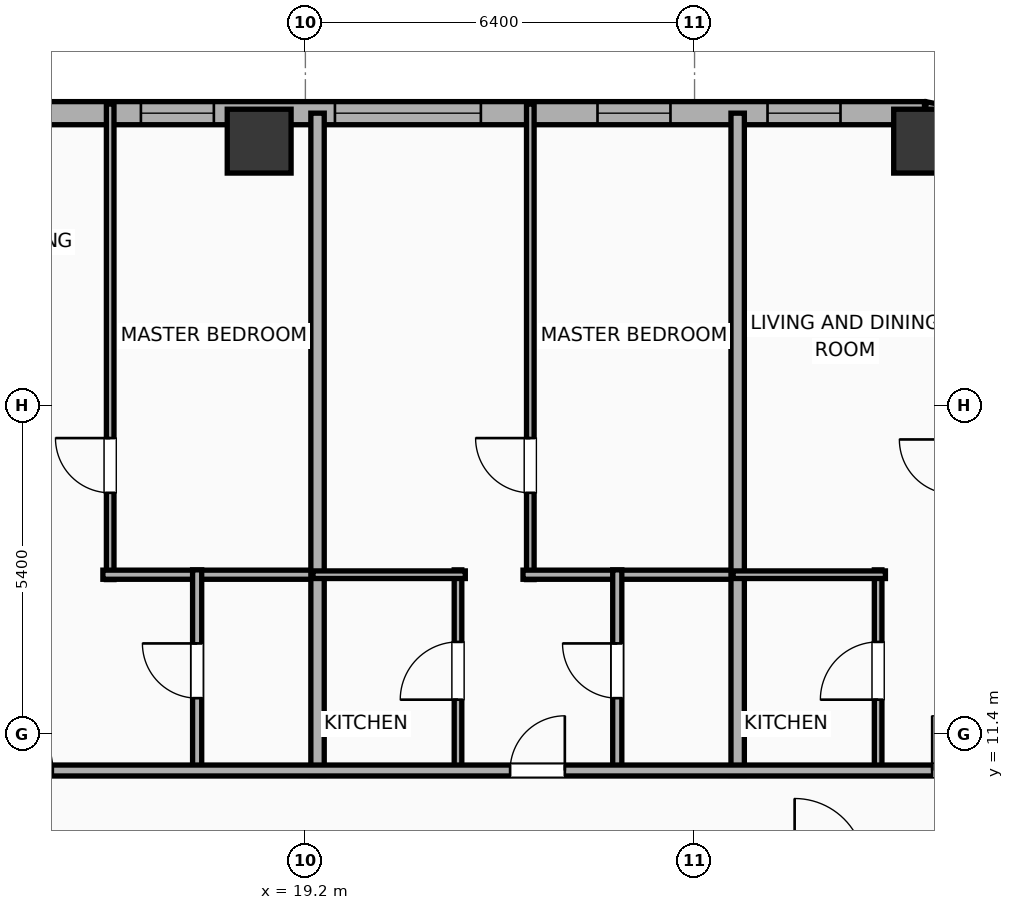
"""IFC4 building model, lengths in metres.
Left out: names, types, materials, properties, quantities, classifications, styles, units other than length and angle.
Written with IfcOpenShell. Run it as: python <this file> out.ifc"""

import sys

from ifc_helpers import new_model, si_unit, direction, frame, frame_2d, origin, origin_2d, place, context, subcontext, project, spatial, rectangle, hollow_rectangle, extrude, element, fill, save


model = new_model("IFC4")
c1 = context("Model", 3, precision=1e-05, world=origin(), true_north=direction((0.0, 1.0)))
c2 = subcontext(c1, "Body", "Model", "MODEL_VIEW")
j1 = project(units=[si_unit("LENGTHUNIT", "METRE"), si_unit("PLANEANGLEUNIT", "RADIAN")], contexts=[c1])
p1 = place(None, origin())
s1 = spatial("IfcSite", under=j1, at=p1, CompositionType="ELEMENT")
p2 = place(p1, origin())
s2 = spatial("IfcBuilding", under=s1, at=p2, CompositionType="ELEMENT")
p3 = place(p2, frame((0.0, 0.0, 132.6)))
s3 = spatial("IfcBuildingStorey", under=s2, at=p3, CompositionType="ELEMENT", Elevation=132.6)
for number, where, z_axis, x_axis in (
    (1, (29.4, 21.15, 0.0), (0.0, 0.0, 1.0), (1.0, 0.0, 0.0)),
    (2, (18.44, 21.15, 0.0), (0.0, 0.0, 1.0), (1.0, 0.0, 0.0)),
):
    element("IfcColumn", number, at=place(p3, frame(where, z_axis=z_axis, x_axis=x_axis)), inside=s3, PredefinedType="COLUMN", context=c2, shape_type="SweptSolid", body=[
        extrude(hollow_rectangle(XDim=1.05, YDim=1.05, WallThickness=0.036, at=origin_2d()), origin(), (0.0, 0.0, 1.0), 3.9),
    ])
p4 = place(p3, frame((-25.381, 21.61, 0.0), z_axis=(0.0, 0.0, 1.0), x_axis=(1.0, 0.0, 0.0)))
e3 = element("IfcWall", 3, at=p4, inside=s3, PredefinedType="ELEMENTEDWALL", context=c2, shape_type="SweptSolid", body=[
    extrude(rectangle(XDim=54.763, YDim=0.38, at=frame_2d((27.381, 0.0))), origin(), (0.0, 0.0, 1.0), 3.65),
])
p5 = place(p4, frame((5.645, 0.0, 0.75)))
e4 = element("IfcOpeningElement", 4, at=p5, cuts=e3, PredefinedType="OPENING", context=c2, shape_type="SweptSolid", body=[
    extrude(rectangle(XDim=2.4, YDim=2.1, at=frame_2d((1.2, 1.05))), frame((0.0, 0.2, 0.0), z_axis=(0.0, -1.0, 0.0), x_axis=(1.0, 0.0, 0.0)), (0.0, 0.0, 1.0), 0.4),
])
p6 = place(p4, frame((45.067, 0.0, 0.75)))
e5 = element("IfcOpeningElement", 5, at=p6, cuts=e3, PredefinedType="OPENING", context=c2, shape_type="SweptSolid", body=[
    extrude(rectangle(XDim=2.4, YDim=2.1, at=frame_2d((1.2, 1.05))), frame((0.0, 0.2, 0.0), z_axis=(0.0, -1.0, 0.0), x_axis=(1.0, 0.0, 0.0)), (0.0, 0.0, 1.0), 0.4),
])
p7 = place(p4, frame((1.831, 0.0, 0.75)))
e6 = element("IfcOpeningElement", 6, at=p7, cuts=e3, PredefinedType="OPENING", context=c2, shape_type="SweptSolid", body=[
    extrude(rectangle(XDim=1.2, YDim=2.05, at=frame_2d((0.6, 1.025))), frame((0.0, 0.2, 0.0), z_axis=(0.0, -1.0, 0.0), x_axis=(1.0, 0.0, 0.0)), (0.0, 0.0, 1.0), 0.4),
])
p8 = place(p4, frame((8.996, 0.0, 0.75)))
e7 = element("IfcOpeningElement", 7, at=p8, cuts=e3, PredefinedType="OPENING", context=c2, shape_type="SweptSolid", body=[
    extrude(rectangle(XDim=1.2, YDim=2.05, at=frame_2d((0.6, 1.025))), frame((0.0, 0.2, 0.0), z_axis=(0.0, -1.0, 0.0), x_axis=(1.0, 0.0, 0.0)), (0.0, 0.0, 1.0), 0.4),
])
p9 = place(p4, frame((15.102, 0.0, 0.75)))
e8 = element("IfcOpeningElement", 8, at=p9, cuts=e3, PredefinedType="OPENING", context=c2, shape_type="SweptSolid", body=[
    extrude(rectangle(XDim=1.2, YDim=2.05, at=frame_2d((0.6, 1.025))), frame((0.0, 0.2, 0.0), z_axis=(0.0, -1.0, 0.0), x_axis=(1.0, 0.0, 0.0)), (0.0, 0.0, 1.0), 0.4),
])
p10 = place(p4, frame((12.352, 0.0, 0.75)))
e9 = element("IfcOpeningElement", 9, at=p10, cuts=e3, PredefinedType="OPENING", context=c2, shape_type="SweptSolid", body=[
    extrude(rectangle(XDim=1.2, YDim=2.05, at=frame_2d((0.6, 1.025))), frame((0.0, 0.2, 0.0), z_axis=(0.0, -1.0, 0.0), x_axis=(1.0, 0.0, 0.0)), (0.0, 0.0, 1.0), 0.4),
])
p11 = place(p4, frame((19.936, 0.0, 0.75)))
e10 = element("IfcOpeningElement", 10, at=p11, cuts=e3, PredefinedType="OPENING", context=c2, shape_type="SweptSolid", body=[
    extrude(rectangle(XDim=1.2, YDim=2.05, at=frame_2d((0.6, 1.025))), frame((0.0, 0.2, 0.0), z_axis=(0.0, -1.0, 0.0), x_axis=(1.0, 0.0, 0.0)), (0.0, 0.0, 1.0), 0.4),
])
p12 = place(p4, frame((17.786, 0.0, 0.75)))
e11 = element("IfcOpeningElement", 11, at=p12, cuts=e3, PredefinedType="OPENING", context=c2, shape_type="SweptSolid", body=[
    extrude(rectangle(XDim=1.2, YDim=2.05, at=frame_2d((0.6, 1.025))), frame((0.0, 0.2, 0.0), z_axis=(0.0, -1.0, 0.0), x_axis=(1.0, 0.0, 0.0)), (0.0, 0.0, 1.0), 0.4),
])
p13 = place(p4, frame((23.826, 0.0, 0.75)))
e12 = element("IfcOpeningElement", 12, at=p13, cuts=e3, PredefinedType="OPENING", context=c2, shape_type="SweptSolid", body=[
    extrude(rectangle(XDim=1.2, YDim=2.05, at=frame_2d((0.6, 1.025))), frame((0.0, 0.2, 0.0), z_axis=(0.0, -1.0, 0.0), x_axis=(1.0, 0.0, 0.0)), (0.0, 0.0, 1.0), 0.4),
])
p14 = place(p4, frame((26.576, 0.0, 0.75)))
e13 = element("IfcOpeningElement", 13, at=p14, cuts=e3, PredefinedType="OPENING", context=c2, shape_type="SweptSolid", body=[
    extrude(rectangle(XDim=1.2, YDim=2.05, at=frame_2d((0.6, 1.025))), frame((0.0, 0.2, 0.0), z_axis=(0.0, -1.0, 0.0), x_axis=(1.0, 0.0, 0.0)), (0.0, 0.0, 1.0), 0.4),
])
p15 = place(p4, frame((30.431, 0.0, 0.75)))
e14 = element("IfcOpeningElement", 14, at=p15, cuts=e3, PredefinedType="OPENING", context=c2, shape_type="SweptSolid", body=[
    extrude(rectangle(XDim=1.2, YDim=2.05, at=frame_2d((0.6, 1.025))), frame((0.0, 0.2, 0.0), z_axis=(0.0, -1.0, 0.0), x_axis=(1.0, 0.0, 0.0)), (0.0, 0.0, 1.0), 0.4),
])
p16 = place(p4, frame((38.581, 0.0, 0.75)))
e15 = element("IfcOpeningElement", 15, at=p16, cuts=e3, PredefinedType="OPENING", context=c2, shape_type="SweptSolid", body=[
    extrude(rectangle(XDim=1.2, YDim=2.05, at=frame_2d((0.6, 1.025))), frame((0.0, 0.2, 0.0), z_axis=(0.0, -1.0, 0.0), x_axis=(1.0, 0.0, 0.0)), (0.0, 0.0, 1.0), 0.4),
])
p17 = place(p4, frame((34.786, 0.0, 0.75)))
e16 = element("IfcOpeningElement", 16, at=p17, cuts=e3, PredefinedType="OPENING", context=c2, shape_type="SweptSolid", body=[
    extrude(rectangle(XDim=1.2, YDim=2.05, at=frame_2d((0.6, 1.025))), frame((0.0, 0.2, 0.0), z_axis=(0.0, -1.0, 0.0), x_axis=(1.0, 0.0, 0.0)), (0.0, 0.0, 1.0), 0.4),
])
p18 = place(p4, frame((41.876, 0.0, 0.75)))
e17 = element("IfcOpeningElement", 17, at=p18, cuts=e3, PredefinedType="OPENING", context=c2, shape_type="SweptSolid", body=[
    extrude(rectangle(XDim=1.2, YDim=2.05, at=frame_2d((0.6, 1.025))), frame((0.0, 0.2, 0.0), z_axis=(0.0, -1.0, 0.0), x_axis=(1.0, 0.0, 0.0)), (0.0, 0.0, 1.0), 0.4),
])
p19 = place(p4, frame((49.385, 0.0, 0.75)))
e18 = element("IfcOpeningElement", 18, at=p19, cuts=e3, PredefinedType="OPENING", context=c2, shape_type="SweptSolid", body=[
    extrude(rectangle(XDim=1.2, YDim=2.05, at=frame_2d((0.6, 1.025))), frame((0.0, 0.2, 0.0), z_axis=(0.0, -1.0, 0.0), x_axis=(1.0, 0.0, 0.0)), (0.0, 0.0, 1.0), 0.4),
])
p20 = place(p4, frame((52.181, 0.0, 0.75)))
e19 = element("IfcOpeningElement", 19, at=p20, cuts=e3, PredefinedType="OPENING", context=c2, shape_type="SweptSolid", body=[
    extrude(rectangle(XDim=1.2, YDim=2.05, at=frame_2d((0.6, 1.025))), frame((0.0, 0.2, 0.0), z_axis=(0.0, -1.0, 0.0), x_axis=(1.0, 0.0, 0.0)), (0.0, 0.0, 1.0), 0.4),
])
p21 = place(p3, frame((29.381, 21.61, 0.0), z_axis=(0.0, 0.0, 1.0), x_axis=(0.980755066645, -0.195242155415, 0.0)))
e20 = element("IfcWall", 20, at=p21, inside=s3, PredefinedType="ELEMENTEDWALL", context=c2, shape_type="SweptSolid", body=[
    extrude(rectangle(XDim=1.504, YDim=0.38, at=frame_2d((0.752, 0.0))), origin(), (0.0, 0.0, 1.0), 3.65),
])
p22 = place(p21, frame((0.732, 0.0, 0.75)))
e21 = element("IfcOpeningElement", 21, at=p22, cuts=e20, PredefinedType="OPENING", context=c2, shape_type="SweptSolid", body=[
    extrude(rectangle(XDim=0.52, YDim=2.05, at=frame_2d((0.26, 1.025))), frame((0.0, 0.2, 0.0), z_axis=(0.0, -1.0, 0.0), x_axis=(1.0, 0.0, 0.0)), (0.0, 0.0, 1.0), 0.4),
])
p23 = place(p3, frame((15.99, 13.94, 0.0), z_axis=(0.0, 0.0, 1.0), x_axis=(0.0, 1.0, 0.0)))
e22 = element("IfcWall", 22, at=p23, inside=s3, PredefinedType="PARTITIONING", context=c2, shape_type="SweptSolid", body=[
    extrude(rectangle(XDim=7.82, YDim=0.125, at=frame_2d((3.91, 0.0))), origin(), (0.0, 0.0, 1.0), 3.65),
])
p24 = place(p23, frame((1.427, 0.0, 0.0)))
e23 = element("IfcOpeningElement", 23, at=p24, cuts=e22, PredefinedType="OPENING", context=c2, shape_type="SweptSolid", body=[
    extrude(rectangle(XDim=0.9, YDim=2.05, at=frame_2d((0.45, 1.025))), frame((0.0, 0.073, 0.0), z_axis=(0.0, -1.0, 0.0), x_axis=(1.0, 0.0, 0.0)), (0.0, 0.0, 1.0), 0.145),
])
p25 = place(p3, frame((15.87, 14.02, 0.0), z_axis=(0.0, 0.0, 1.0), x_axis=(1.0, 0.0, 0.0)))
e24 = element("IfcWall", 24, at=p25, inside=s3, PredefinedType="PLUMBINGWALL", context=c2, shape_type="SweptSolid", body=[
    extrude(rectangle(XDim=3.605, YDim=0.15, at=frame_2d((1.802, 0.0))), origin(), (0.0, 0.0, 1.0), 3.65),
])
p26 = place(p3, frame((17.42, 10.78, 0.0), z_axis=(0.0, 0.0, 1.0), x_axis=(0.0, 1.0, 0.0)))
e25 = element("IfcWall", 25, at=p26, inside=s3, PredefinedType="PLUMBINGWALL", context=c2, shape_type="SweptSolid", body=[
    extrude(rectangle(XDim=3.32, YDim=0.15, at=frame_2d((1.66, 0.0))), origin(), (0.0, 0.0, 1.0), 3.65),
])
p27 = place(p26, frame((1.21, 0.0, 0.0)))
e26 = element("IfcOpeningElement", 26, at=p27, cuts=e25, PredefinedType="OPENING", context=c2, shape_type="SweptSolid", body=[
    extrude(rectangle(XDim=0.9, YDim=2.05, at=frame_2d((0.45, 1.025))), frame((0.0, 0.085, 0.0), z_axis=(0.0, -1.0, 0.0), x_axis=(1.0, 0.0, 0.0)), (0.0, 0.0, 1.0), 0.17),
])
p28 = place(p3, frame((19.4, 10.72, 0.0), z_axis=(0.0, 0.0, 1.0), x_axis=(0.0, 1.0, 0.0)))
e27 = element("IfcWall", 27, at=p28, inside=s3, PredefinedType="PARTITIONING", context=c2, shape_type="SweptSolid", body=[
    extrude(rectangle(XDim=10.89, YDim=0.22, at=frame_2d((5.445, 0.0))), origin(), (0.0, 0.0, 1.0), 3.65),
])
p29 = place(p3, frame((22.899, 13.94, 0.0), z_axis=(0.0, 0.0, 1.0), x_axis=(0.0, 1.0, 0.0)))
e28 = element("IfcWall", 28, at=p29, inside=s3, PredefinedType="PARTITIONING", context=c2, shape_type="SweptSolid", body=[
    extrude(rectangle(XDim=7.82, YDim=0.125, at=frame_2d((3.91, 0.0))), origin(), (0.0, 0.0, 1.0), 3.65),
])
p30 = place(p29, frame((1.427, 0.0, 0.0)))
e29 = element("IfcOpeningElement", 29, at=p30, cuts=e28, PredefinedType="OPENING", context=c2, shape_type="SweptSolid", body=[
    extrude(rectangle(XDim=0.9, YDim=2.05, at=frame_2d((0.45, 1.025))), frame((0.0, 0.073, 0.0), z_axis=(0.0, -1.0, 0.0), x_axis=(1.0, 0.0, 0.0)), (0.0, 0.0, 1.0), 0.145),
])
p31 = place(p3, frame((22.779, 14.02, 0.0), z_axis=(0.0, 0.0, 1.0), x_axis=(1.0, 0.0, 0.0)))
e30 = element("IfcWall", 30, at=p31, inside=s3, PredefinedType="PLUMBINGWALL", context=c2, shape_type="SweptSolid", body=[
    extrude(rectangle(XDim=3.605, YDim=0.15, at=frame_2d((1.802, 0.0))), origin(), (0.0, 0.0, 1.0), 3.65),
])
p32 = place(p3, frame((21.71, 10.78, 0.0), z_axis=(0.0, 0.0, 1.0), x_axis=(0.0, 1.0, 0.0)))
e31 = element("IfcWall", 31, at=p32, inside=s3, PredefinedType="PARTITIONING", context=c2, shape_type="SweptSolid", body=[
    extrude(rectangle(XDim=3.32, YDim=0.125, at=frame_2d((1.66, 0.0))), origin(), (0.0, 0.0, 1.0), 3.65),
])
p33 = place(p32, frame((1.185, 0.0, 0.0)))
e32 = element("IfcOpeningElement", 32, at=p33, cuts=e31, PredefinedType="OPENING", context=c2, shape_type="SweptSolid", body=[
    extrude(rectangle(XDim=0.95, YDim=2.05, at=frame_2d((0.475, 1.025))), frame((0.0, 0.073, 0.0), z_axis=(0.0, -1.0, 0.0), x_axis=(1.0, 0.0, 0.0)), (0.0, 0.0, 1.0), 0.145),
])
p34 = place(p3, frame((19.325, 14.02, 0.0), z_axis=(0.0, 0.0, 1.0), x_axis=(1.0, 0.0, 0.0)))
e33 = element("IfcWall", 33, at=p34, inside=s3, PredefinedType="PARTITIONING", context=c2, shape_type="SweptSolid", body=[
    extrude(rectangle(XDim=2.505, YDim=0.125, at=frame_2d((1.252, 0.0))), origin(), (0.0, 0.0, 1.0), 3.65),
])
p35 = place(p3, frame((24.329, 10.78, 0.0), z_axis=(0.0, 0.0, 1.0), x_axis=(0.0, 1.0, 0.0)))
e34 = element("IfcWall", 34, at=p35, inside=s3, PredefinedType="PLUMBINGWALL", context=c2, shape_type="SweptSolid", body=[
    extrude(rectangle(XDim=3.32, YDim=0.15, at=frame_2d((1.66, 0.0))), origin(), (0.0, 0.0, 1.0), 3.65),
])
p36 = place(p35, frame((1.21, 0.0, 0.0)))
e35 = element("IfcOpeningElement", 35, at=p36, cuts=e34, PredefinedType="OPENING", context=c2, shape_type="SweptSolid", body=[
    extrude(rectangle(XDim=0.9, YDim=2.05, at=frame_2d((0.45, 1.025))), frame((0.0, 0.085, 0.0), z_axis=(0.0, -1.0, 0.0), x_axis=(1.0, 0.0, 0.0)), (0.0, 0.0, 1.0), 0.17),
])
p37 = place(p3, frame((26.309, 10.72, 0.0), z_axis=(0.0, 0.0, 1.0), x_axis=(0.0, 1.0, 0.0)))
e36 = element("IfcWall", 36, at=p37, inside=s3, PredefinedType="PARTITIONING", context=c2, shape_type="SweptSolid", body=[
    extrude(rectangle(XDim=10.89, YDim=0.22, at=frame_2d((5.445, 0.0))), origin(), (0.0, 0.0, 1.0), 3.65),
])
p38 = place(p3, frame((28.619, 10.78, 0.0), z_axis=(0.0, 0.0, 1.0), x_axis=(0.0, 1.0, 0.0)))
e37 = element("IfcWall", 37, at=p38, inside=s3, PredefinedType="PARTITIONING", context=c2, shape_type="SweptSolid", body=[
    extrude(rectangle(XDim=3.32, YDim=0.125, at=frame_2d((1.66, 0.0))), origin(), (0.0, 0.0, 1.0), 3.65),
])
p39 = place(p38, frame((1.185, 0.0, 0.0)))
e38 = element("IfcOpeningElement", 38, at=p39, cuts=e37, PredefinedType="OPENING", context=c2, shape_type="SweptSolid", body=[
    extrude(rectangle(XDim=0.95, YDim=2.05, at=frame_2d((0.475, 1.025))), frame((0.0, 0.073, 0.0), z_axis=(0.0, -1.0, 0.0), x_axis=(1.0, 0.0, 0.0)), (0.0, 0.0, 1.0), 0.145),
])
p40 = place(p3, frame((26.234, 14.02, 0.0), z_axis=(0.0, 0.0, 1.0), x_axis=(1.0, 0.0, 0.0)))
e39 = element("IfcWall", 39, at=p40, inside=s3, PredefinedType="PARTITIONING", context=c2, shape_type="SweptSolid", body=[
    extrude(rectangle(XDim=2.505, YDim=0.125, at=frame_2d((1.252, 0.0))), origin(), (0.0, 0.0, 1.0), 3.65),
])
p41 = place(p3, frame((-29.21, 10.8, 0.0), z_axis=(0.0, 0.0, 1.0), x_axis=(1.0, 0.0, 0.0)))
e40 = element("IfcWall", 40, at=p41, inside=s3, PredefinedType="PARTITIONING", context=c2, shape_type="SweptSolid", body=[
    extrude(rectangle(XDim=62.42, YDim=0.18, at=frame_2d((31.21, 0.0))), origin(), (0.0, 0.0, 1.0), 3.65),
])
p42 = place(p41, frame((3.457, 0.0, 0.0)))
e41 = element("IfcOpeningElement", 41, at=p42, cuts=e40, PredefinedType="OPENING", context=c2, shape_type="SweptSolid", body=[
    extrude(rectangle(XDim=1.15, YDim=2.05, at=frame_2d((0.575, 1.025))), frame((0.0, 0.1, 0.0), z_axis=(0.0, -1.0, 0.0), x_axis=(1.0, 0.0, 0.0)), (0.0, 0.0, 1.0), 0.2),
])
p43 = place(p41, frame((11.297, 0.0, 0.0)))
e42 = element("IfcOpeningElement", 42, at=p43, cuts=e40, PredefinedType="OPENING", context=c2, shape_type="SweptSolid", body=[
    extrude(rectangle(XDim=1.15, YDim=2.05, at=frame_2d((0.575, 1.025))), frame((0.0, 0.1, 0.0), z_axis=(0.0, -1.0, 0.0), x_axis=(1.0, 0.0, 0.0)), (0.0, 0.0, 1.0), 0.2),
])
p44 = place(p41, frame((18.925, 0.0, 0.0)))
e43 = element("IfcOpeningElement", 43, at=p44, cuts=e40, PredefinedType="OPENING", context=c2, shape_type="SweptSolid", body=[
    extrude(rectangle(XDim=1.15, YDim=2.05, at=frame_2d((0.575, 1.025))), frame((0.0, 0.1, 0.0), z_axis=(0.0, -1.0, 0.0), x_axis=(1.0, 0.0, 0.0)), (0.0, 0.0, 1.0), 0.2),
])
p45 = place(p41, frame((24.362, 0.0, 0.0)))
e44 = element("IfcOpeningElement", 44, at=p45, cuts=e40, PredefinedType="OPENING", context=c2, shape_type="SweptSolid", body=[
    extrude(rectangle(XDim=1.15, YDim=2.05, at=frame_2d((0.575, 1.025))), frame((0.0, 0.1, 0.0), z_axis=(0.0, -1.0, 0.0), x_axis=(1.0, 0.0, 0.0)), (0.0, 0.0, 1.0), 0.2),
])
p46 = place(p41, frame((27.708, 0.0, 0.0)))
e45 = element("IfcOpeningElement", 45, at=p46, cuts=e40, PredefinedType="OPENING", context=c2, shape_type="SweptSolid", body=[
    extrude(rectangle(XDim=1.15, YDim=2.05, at=frame_2d((0.575, 1.025))), frame((0.0, 0.1, 0.0), z_axis=(0.0, -1.0, 0.0), x_axis=(1.0, 0.0, 0.0)), (0.0, 0.0, 1.0), 0.2),
])
p47 = place(p41, frame((34.618, 0.0, 0.0)))
e46 = element("IfcOpeningElement", 46, at=p47, cuts=e40, PredefinedType="OPENING", context=c2, shape_type="SweptSolid", body=[
    extrude(rectangle(XDim=0.9, YDim=2.05, at=frame_2d((0.45, 1.025))), frame((0.0, 0.1, 0.0), z_axis=(0.0, -1.0, 0.0), x_axis=(1.0, 0.0, 0.0)), (0.0, 0.0, 1.0), 0.2),
])
p48 = place(p41, frame((43.106, 0.0, 0.0)))
e47 = element("IfcOpeningElement", 47, at=p48, cuts=e40, PredefinedType="OPENING", context=c2, shape_type="SweptSolid", body=[
    extrude(rectangle(XDim=1.15, YDim=2.05, at=frame_2d((0.575, 1.025))), frame((0.0, 0.1, 0.0), z_axis=(0.0, -1.0, 0.0), x_axis=(1.0, 0.0, 0.0)), (0.0, 0.0, 1.0), 0.2),
])
p49 = place(p41, frame((51.777, 0.0, 0.0)))
e48 = element("IfcOpeningElement", 48, at=p49, cuts=e40, PredefinedType="OPENING", context=c2, shape_type="SweptSolid", body=[
    extrude(rectangle(XDim=0.9, YDim=2.05, at=frame_2d((0.45, 1.025))), frame((0.0, 0.1, 0.0), z_axis=(0.0, -1.0, 0.0), x_axis=(1.0, 0.0, 0.0)), (0.0, 0.0, 1.0), 0.2),
])
p50 = place(p41, frame((58.718, 0.0, 0.0)))
e49 = element("IfcOpeningElement", 49, at=p50, cuts=e40, PredefinedType="OPENING", context=c2, shape_type="SweptSolid", body=[
    extrude(rectangle(XDim=0.9, YDim=2.05, at=frame_2d((0.45, 1.025))), frame((0.0, 0.1, 0.0), z_axis=(0.0, -1.0, 0.0), x_axis=(1.0, 0.0, 0.0)), (0.0, 0.0, 1.0), 0.2),
])
p51 = place(p6, origin())
e50 = element("IfcWindow", 50, at=p51, inside=s3, PartitioningType="SINGLE_PANEL", PredefinedType="WINDOW", context=c2, shape_type="SweptSolid", body=[
    extrude(rectangle(XDim=2.4, YDim=2.1, at=frame_2d((1.2, 1.05))), frame((0.0, 0.03, 0.0), z_axis=(0.0, -1.0, 0.0), x_axis=(1.0, 0.0, 0.0)), (0.0, 0.0, 1.0), 0.06),
])
fill(e5, e50)
p52 = place(p18, origin())
e51 = element("IfcWindow", 51, at=p52, inside=s3, PartitioningType="SINGLE_PANEL", PredefinedType="WINDOW", context=c2, shape_type="SweptSolid", body=[
    extrude(rectangle(XDim=1.2, YDim=2.05, at=frame_2d((0.6, 1.025))), frame((0.0, 0.03, 0.0), z_axis=(0.0, -1.0, 0.0), x_axis=(1.0, 0.0, 0.0)), (0.0, 0.0, 1.0), 0.06),
])
fill(e17, e51)
p53 = place(p19, origin())
e52 = element("IfcWindow", 52, at=p53, inside=s3, PartitioningType="SINGLE_PANEL", PredefinedType="WINDOW", context=c2, shape_type="SweptSolid", body=[
    extrude(rectangle(XDim=1.2, YDim=2.05, at=frame_2d((0.6, 1.025))), frame((0.0, 0.03, 0.0), z_axis=(0.0, -1.0, 0.0), x_axis=(1.0, 0.0, 0.0)), (0.0, 0.0, 1.0), 0.06),
])
fill(e18, e52)
p54 = place(p20, origin())
e53 = element("IfcWindow", 53, at=p54, inside=s3, PartitioningType="SINGLE_PANEL", PredefinedType="WINDOW", context=c2, shape_type="SweptSolid", body=[
    extrude(rectangle(XDim=1.2, YDim=2.05, at=frame_2d((0.6, 1.025))), frame((0.0, 0.03, 0.0), z_axis=(0.0, -1.0, 0.0), x_axis=(1.0, 0.0, 0.0)), (0.0, 0.0, 1.0), 0.06),
])
fill(e19, e53)
p55 = place(p24, origin())
e54 = element("IfcDoor", 54, at=p55, inside=s3, OperationType="SINGLE_SWING_RIGHT", PredefinedType="DOOR", context=c2, shape_type="SweptSolid", body=[
    extrude(rectangle(XDim=0.9, YDim=2.05, at=frame_2d((0.45, 1.025))), frame((0.0, 0.025, 0.0), z_axis=(0.0, -1.0, 0.0), x_axis=(1.0, 0.0, 0.0)), (0.0, 0.0, 1.0), 0.05),
])
fill(e23, e54)
p56 = place(p27, origin())
e55 = element("IfcDoor", 55, at=p56, inside=s3, OperationType="SINGLE_SWING_RIGHT", PredefinedType="DOOR", context=c2, shape_type="SweptSolid", body=[
    extrude(rectangle(XDim=0.9, YDim=2.05, at=frame_2d((0.45, 1.025))), frame((0.0, 0.025, 0.0), z_axis=(0.0, -1.0, 0.0), x_axis=(1.0, 0.0, 0.0)), (0.0, 0.0, 1.0), 0.05),
])
fill(e26, e55)
p57 = place(p30, origin())
e56 = element("IfcDoor", 56, at=p57, inside=s3, OperationType="SINGLE_SWING_RIGHT", PredefinedType="DOOR", context=c2, shape_type="SweptSolid", body=[
    extrude(rectangle(XDim=0.9, YDim=2.05, at=frame_2d((0.45, 1.025))), frame((0.0, 0.025, 0.0), z_axis=(0.0, -1.0, 0.0), x_axis=(1.0, 0.0, 0.0)), (0.0, 0.0, 1.0), 0.05),
])
fill(e29, e56)
p58 = place(p33, origin())
e57 = element("IfcDoor", 57, at=p58, inside=s3, OperationType="SINGLE_SWING_LEFT", PredefinedType="DOOR", context=c2, shape_type="SweptSolid", body=[
    extrude(rectangle(XDim=0.95, YDim=2.05, at=frame_2d((0.475, 1.025))), frame((0.0, 0.025, 0.0), z_axis=(0.0, -1.0, 0.0), x_axis=(1.0, 0.0, 0.0)), (0.0, 0.0, 1.0), 0.05),
])
fill(e32, e57)
p59 = place(p36, origin())
e58 = element("IfcDoor", 58, at=p59, inside=s3, OperationType="SINGLE_SWING_RIGHT", PredefinedType="DOOR", context=c2, shape_type="SweptSolid", body=[
    extrude(rectangle(XDim=0.9, YDim=2.05, at=frame_2d((0.45, 1.025))), frame((0.0, 0.025, 0.0), z_axis=(0.0, -1.0, 0.0), x_axis=(1.0, 0.0, 0.0)), (0.0, 0.0, 1.0), 0.05),
])
fill(e35, e58)
p60 = place(p39, origin())
e59 = element("IfcDoor", 59, at=p60, inside=s3, OperationType="SINGLE_SWING_LEFT", PredefinedType="DOOR", context=c2, shape_type="SweptSolid", body=[
    extrude(rectangle(XDim=0.95, YDim=2.05, at=frame_2d((0.475, 1.025))), frame((0.0, 0.025, 0.0), z_axis=(0.0, -1.0, 0.0), x_axis=(1.0, 0.0, 0.0)), (0.0, 0.0, 1.0), 0.05),
])
fill(e38, e59)
p61 = place(p49, origin())
e60 = element("IfcDoor", 60, at=p61, inside=s3, OperationType="SINGLE_SWING_RIGHT", PredefinedType="DOOR", context=c2, shape_type="SweptSolid", body=[
    extrude(rectangle(XDim=0.9, YDim=2.05, at=frame_2d((0.45, 1.025))), frame((0.0, 0.025, 0.0), z_axis=(0.0, -1.0, 0.0), x_axis=(1.0, 0.0, 0.0)), (0.0, 0.0, 1.0), 0.05),
])
fill(e48, e60)
p62 = place(p50, origin())
e61 = element("IfcDoor", 61, at=p62, inside=s3, OperationType="SINGLE_SWING_LEFT", PredefinedType="DOOR", context=c2, shape_type="SweptSolid", body=[
    extrude(rectangle(XDim=0.9, YDim=2.05, at=frame_2d((0.45, 1.025))), frame((0.0, 0.025, 0.0), z_axis=(0.0, -1.0, 0.0), x_axis=(1.0, 0.0, 0.0)), (0.0, 0.0, 1.0), 0.05),
])
fill(e49, e61)
save(model, sys.argv[1])
